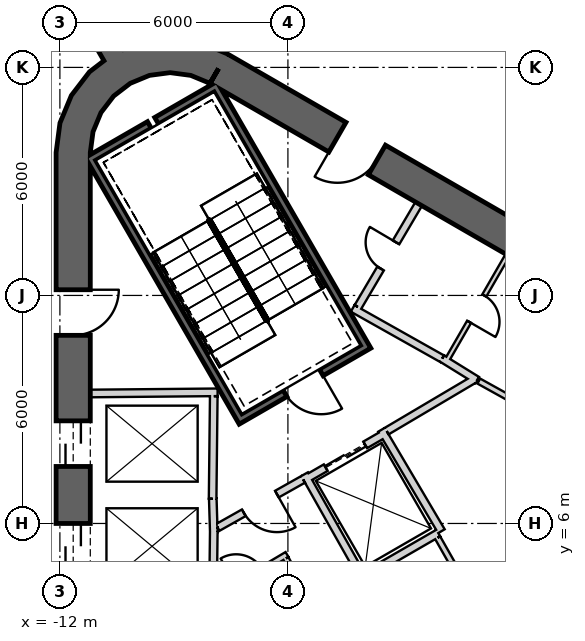
"""IFC4 building model, lengths in metres.
Left out: names, types, materials, properties, quantities, classifications, styles, units other than length and angle.
Written with IfcOpenShell. Run it as: python <this file> out.ifc"""

import sys

from ifc_helpers import new_model, si_unit, direction, frame, frame_2d, origin, place, context, subcontext, project, spatial, polyline, rectangle, outline, extrude, element, fill, save


model = new_model("IFC4")
c1 = context("Model", 3, precision=1e-05, world=origin(), true_north=direction((0.0, 1.0)))
c2 = subcontext(c1, "Body", "Model", "MODEL_VIEW")
j1 = project(units=[si_unit("LENGTHUNIT", "METRE"), si_unit("PLANEANGLEUNIT", "RADIAN")], contexts=[c1])
p1 = place(None, origin())
s1 = spatial("IfcSite", under=j1, at=p1, CompositionType="ELEMENT")
p2 = place(p1, origin())
s2 = spatial("IfcBuilding", under=s1, at=p2, CompositionType="ELEMENT")
p3 = place(p2, frame((0.0, 0.0, 392.3)))
s3 = spatial("IfcBuildingStorey", under=s2, at=p3, CompositionType="ELEMENT", Elevation=392.3)
p4 = place(p3, frame((19.475, 2.208, 0.0), z_axis=(0.0, 0.0, 1.0), x_axis=(-0.866028369851, 0.499994862586, 0.0)))
e1 = element("IfcWall", 1, at=p4, inside=s3, PredefinedType="SHEAR", context=c2, shape_type="SweptSolid", body=[
    extrude(rectangle(XDim=31.523, YDim=0.9, at=frame_2d((15.762, 0.0))), origin(), (0.0, 0.0, 1.0), 6.0),
])
p5 = place(p4, frame((7.062, 0.0, 0.0)))
e2 = element("IfcOpeningElement", 2, at=p5, cuts=e1, PredefinedType="OPENING", context=c2, shape_type="SweptSolid", body=[
    extrude(rectangle(XDim=1.2, YDim=2.4, at=frame_2d((0.6, 1.2))), frame((0.0, 0.46, 0.0), z_axis=(0.0, -1.0, 0.0), x_axis=(1.0, 0.0, 0.0)), (0.0, 0.0, 1.0), 0.92),
])
p6 = place(p4, frame((3.612, 0.0, 0.0)))
e3 = element("IfcOpeningElement", 3, at=p6, cuts=e1, PredefinedType="OPENING", context=c2, shape_type="SweptSolid", body=[
    extrude(rectangle(XDim=1.2, YDim=2.4, at=frame_2d((0.6, 1.2))), frame((0.0, 0.46, 0.0), z_axis=(0.0, -1.0, 0.0), x_axis=(1.0, 0.0, 0.0)), (0.0, 0.0, 1.0), 0.92),
])
p7 = place(p4, frame((26.712, 0.0, 0.0)))
e4 = element("IfcOpeningElement", 4, at=p7, cuts=e1, PredefinedType="OPENING", context=c2, shape_type="SweptSolid", body=[
    extrude(rectangle(XDim=1.2, YDim=2.4, at=frame_2d((0.6, 1.2))), frame((0.0, 0.46, 0.0), z_axis=(0.0, -1.0, 0.0), x_axis=(1.0, 0.0, 0.0)), (0.0, 0.0, 1.0), 0.92),
])
p8 = place(p3, frame((-11.65, 15.762, 0.0), z_axis=(0.0, 0.0, 1.0), x_axis=(0.0, -1.0, 0.0)))
e5 = element("IfcWall", 5, at=p8, inside=s3, PredefinedType="SHEAR", context=c2, shape_type="SweptSolid", body=[
    extrude(rectangle(XDim=31.523, YDim=0.9, at=frame_2d((15.762, 0.0))), origin(), (0.0, 0.0, 1.0), 6.0),
])
p9 = place(p8, frame((7.062, 0.0, 0.0)))
e6 = element("IfcOpeningElement", 6, at=p9, cuts=e5, PredefinedType="OPENING", context=c2, shape_type="SweptSolid", body=[
    extrude(rectangle(XDim=1.2, YDim=2.4, at=frame_2d((0.6, 1.2))), frame((0.0, 0.46, 0.0), z_axis=(0.0, -1.0, 0.0), x_axis=(1.0, 0.0, 0.0)), (0.0, 0.0, 1.0), 0.92),
])
p10 = place(p8, frame((9.762, 0.0, 0.0)))
e7 = element("IfcOpeningElement", 7, at=p10, cuts=e5, PredefinedType="OPENING", context=c2, shape_type="SweptSolid", body=[
    extrude(rectangle(XDim=1.2, YDim=2.4, at=frame_2d((0.6, 1.2))), frame((0.0, 0.46, 0.0), z_axis=(0.0, -1.0, 0.0), x_axis=(1.0, 0.0, 0.0)), (0.0, 0.0, 1.0), 0.92),
])
p11 = place(p8, frame((12.462, 0.0, 0.0)))
e8 = element("IfcOpeningElement", 8, at=p11, cuts=e5, PredefinedType="OPENING", context=c2, shape_type="SweptSolid", body=[
    extrude(rectangle(XDim=1.2, YDim=2.4, at=frame_2d((0.6, 1.2))), frame((0.0, 0.46, 0.0), z_axis=(0.0, -1.0, 0.0), x_axis=(1.0, 0.0, 0.0)), (0.0, 0.0, 1.0), 0.92),
])
p12 = place(p8, frame((15.162, 0.0, 0.0)))
e9 = element("IfcOpeningElement", 9, at=p12, cuts=e5, PredefinedType="OPENING", context=c2, shape_type="SweptSolid", body=[
    extrude(rectangle(XDim=1.2, YDim=2.4, at=frame_2d((0.6, 1.2))), frame((0.0, 0.46, 0.0), z_axis=(0.0, -1.0, 0.0), x_axis=(1.0, 0.0, 0.0)), (0.0, 0.0, 1.0), 0.92),
])
p13 = place(p8, frame((17.862, 0.0, 0.0)))
e10 = element("IfcOpeningElement", 10, at=p13, cuts=e5, PredefinedType="OPENING", context=c2, shape_type="SweptSolid", body=[
    extrude(rectangle(XDim=1.2, YDim=2.4, at=frame_2d((0.6, 1.2))), frame((0.0, 0.46, 0.0), z_axis=(0.0, -1.0, 0.0), x_axis=(1.0, 0.0, 0.0)), (0.0, 0.0, 1.0), 0.92),
])
p14 = place(p8, frame((20.562, 0.0, 0.0)))
e11 = element("IfcOpeningElement", 11, at=p14, cuts=e5, PredefinedType="OPENING", context=c2, shape_type="SweptSolid", body=[
    extrude(rectangle(XDim=1.2, YDim=2.4, at=frame_2d((0.6, 1.2))), frame((0.0, 0.46, 0.0), z_axis=(0.0, -1.0, 0.0), x_axis=(1.0, 0.0, 0.0)), (0.0, 0.0, 1.0), 0.92),
])
p15 = place(p8, frame((23.262, 0.0, 0.0)))
e12 = element("IfcOpeningElement", 12, at=p15, cuts=e5, PredefinedType="OPENING", context=c2, shape_type="SweptSolid", body=[
    extrude(rectangle(XDim=1.2, YDim=2.4, at=frame_2d((0.6, 1.2))), frame((0.0, 0.46, 0.0), z_axis=(0.0, -1.0, 0.0), x_axis=(1.0, 0.0, 0.0)), (0.0, 0.0, 1.0), 0.92),
])
p16 = place(p8, frame((3.612, 0.0, 0.0)))
e13 = element("IfcOpeningElement", 13, at=p16, cuts=e5, PredefinedType="OPENING", context=c2, shape_type="SweptSolid", body=[
    extrude(rectangle(XDim=1.2, YDim=2.4, at=frame_2d((0.6, 1.2))), frame((0.0, 0.46, 0.0), z_axis=(0.0, -1.0, 0.0), x_axis=(1.0, 0.0, 0.0)), (0.0, 0.0, 1.0), 0.92),
])
p17 = place(p8, frame((26.712, 0.0, 0.0)))
e14 = element("IfcOpeningElement", 14, at=p17, cuts=e5, PredefinedType="OPENING", context=c2, shape_type="SweptSolid", body=[
    extrude(rectangle(XDim=1.2, YDim=2.4, at=frame_2d((0.6, 1.2))), frame((0.0, 0.46, 0.0), z_axis=(0.0, -1.0, 0.0), x_axis=(1.0, 0.0, 0.0)), (0.0, 0.0, 1.0), 0.92),
])
p18 = place(p3, origin())
e15 = element("IfcWall", 15, at=p18, inside=s3, PredefinedType="SHEAR", context=c2, shape_type="SweptSolid", body=[
    extrude(outline(polyline([(-7.6, 18.36), (-8.323, 18.659), (-9.1, 18.762), (-9.876, 18.659), (-10.6, 18.36), (-11.221, 17.883), (-11.698, 17.262), (-11.998, 16.538), (-12.1, 15.762), (-11.2, 15.762), (-11.128, 16.305), (-10.919, 16.812), (-10.585, 17.247), (-10.15, 17.58), (-9.644, 17.79), (-9.1, 17.862), (-8.556, 17.79), (-8.05, 17.58), (-7.6, 18.36)])), origin(), (0.0, 0.0, 1.0), 6.0),
])
p19 = place(p3, frame((-10.575, 18.316, 0.0), z_axis=(0.0, 0.0, 1.0), x_axis=(-0.500011655475, 0.866018674388, 0.0)))
e16 = element("IfcWall", 16, at=p19, inside=s3, PredefinedType="SHEAR", context=c2, shape_type="SweptSolid", body=[
    extrude(rectangle(XDim=6.455, YDim=0.6, at=frame_2d((3.228, 0.0))), origin(), (0.0, 0.0, 1.0), 6.0),
])
p20 = place(p19, frame((2.05, 0.0, 0.0)))
e17 = element("IfcOpeningElement", 17, at=p20, cuts=e16, PredefinedType="OPENING", context=c2, shape_type="SweptSolid", body=[
    extrude(rectangle(XDim=1.4, YDim=2.4, at=frame_2d((0.7, 1.2))), frame((0.0, 0.31, 0.0), z_axis=(0.0, -1.0, 0.0), x_axis=(1.0, 0.0, 0.0)), (0.0, 0.0, 1.0), 0.62),
])
p21 = place(p3, frame((-11.2, 9.42, 0.0), z_axis=(0.0, 0.0, 1.0), x_axis=(0.999957167047, 0.009255488683, 0.0)))
e18 = element("IfcWall", 18, at=p21, inside=s3, PredefinedType="PLUMBINGWALL", context=c2, shape_type="SweptSolid", body=[
    extrude(rectangle(XDim=3.35, YDim=0.2, at=frame_2d((1.675, 0.0))), origin(), (0.0, 0.0, 1.0), 5.7),
])
p22 = place(p3, frame((-7.951, 9.35, 0.0), z_axis=(0.0, 0.0, 1.0), x_axis=(-0.011120469654, -0.999938165666, 0.0)))
e19 = element("IfcWall", 19, at=p22, inside=s3, PredefinedType="PLUMBINGWALL", context=c2, shape_type="SweptSolid", body=[
    extrude(rectangle(XDim=2.7, YDim=0.2, at=frame_2d((1.35, 0.0))), origin(), (0.0, 0.0, 1.0), 5.7),
])
p23 = place(p3, frame((-7.977, 6.65, 0.0), z_axis=(0.0, 0.0, 1.0), x_axis=(0.030861509705, -0.999523670164, 0.0)))
e20 = element("IfcWall", 20, at=p23, inside=s3, PredefinedType="PLUMBINGWALL", context=c2, shape_type="SweptSolid", body=[
    extrude(rectangle(XDim=0.878, YDim=0.2, at=frame_2d((0.439, 0.0))), origin(), (0.0, 0.0, 1.0), 5.7),
])
p24 = place(p3, frame((-7.949, 5.895, 0.0), z_axis=(0.0, 0.0, 1.0), x_axis=(-0.012042535896, -0.999927486035, 0.0)))
e21 = element("IfcWall", 21, at=p24, inside=s3, PredefinedType="PLUMBINGWALL", context=c2, shape_type="SweptSolid", body=[
    extrude(rectangle(XDim=1.845, YDim=0.2, at=frame_2d((0.922, 0.0))), origin(), (0.0, 0.0, 1.0), 5.7),
])
p25 = place(p3, frame((-11.245, 15.678, -0.35), z_axis=(0.0, 0.0, 1.0), x_axis=(0.499977274689, -0.866038523851, 0.0)))
e22 = element("IfcWall", 22, at=p25, inside=s3, PredefinedType="SHEAR", context=c2, shape_type="SweptSolid", body=[
    extrude(rectangle(XDim=8.1, YDim=0.2, at=frame_2d((4.05, 0.0))), origin(), (0.0, 0.0, 1.0), 6.05),
])
p26 = place(p3, frame((-7.818, 17.541, -0.35), z_axis=(0.0, 0.0, 1.0), x_axis=(-0.866088799389, -0.499890179513, 0.0)))
e23 = element("IfcWall", 23, at=p26, inside=s3, PredefinedType="SHEAR", context=c2, shape_type="SweptSolid", body=[
    extrude(rectangle(XDim=1.89, YDim=0.2, at=frame_2d((0.945, 0.0))), origin(), (0.0, 0.0, 1.0), 6.05),
])
p27 = place(p3, frame((-9.645, 16.486, -0.35), z_axis=(0.0, 0.0, 1.0), x_axis=(-0.866038843867, -0.499976720371, 0.0)))
e24 = element("IfcWall", 24, at=p27, inside=s3, PredefinedType="SHEAR", context=c2, shape_type="SweptSolid", body=[
    extrude(rectangle(XDim=1.69, YDim=0.2, at=frame_2d((0.845, 0.0))), origin(), (0.0, 0.0, 1.0), 6.05),
])
p28 = place(p3, frame((-7.854, 17.405, -0.35), z_axis=(0.0, 0.0, 1.0), x_axis=(0.499997992926, -0.866026562566, 0.0)))
e25 = element("IfcWall", 25, at=p28, inside=s3, PredefinedType="SHEAR", context=c2, shape_type="SweptSolid", body=[
    extrude(rectangle(XDim=7.9, YDim=0.2, at=frame_2d((3.95, 0.0))), origin(), (0.0, 0.0, 1.0), 6.05),
])
p29 = place(p3, frame((-7.159, 8.8, -0.35), z_axis=(0.0, 0.0, 1.0), x_axis=(0.866047807691, 0.499961193289, 0.0)))
e26 = element("IfcWall", 26, at=p29, inside=s3, PredefinedType="SHEAR", context=c2, shape_type="SweptSolid", body=[
    extrude(rectangle(XDim=3.6, YDim=0.2, at=frame_2d((1.8, 0.0))), origin(), (0.0, 0.0, 1.0), 6.05),
])
p30 = place(p29, frame((1.25, 0.0, 0.35)))
e27 = element("IfcOpeningElement", 27, at=p30, cuts=e26, PredefinedType="OPENING", context=c2, shape_type="SweptSolid", body=[
    extrude(rectangle(XDim=1.1, YDim=2.1, at=frame_2d((0.55, 1.05))), frame((0.0, 0.11, 0.0), z_axis=(0.0, -1.0, 0.0), x_axis=(1.0, 0.0, 0.0)), (0.0, 0.0, 1.0), 0.22),
])
p31 = place(p3, frame((-5.524, 7.168, 0.0), z_axis=(0.0, 0.0, 1.0), x_axis=(0.866024647952, 0.500001309137, 0.0)))
e28 = element("IfcWall", 28, at=p31, inside=s3, PredefinedType="PLUMBINGWALL", context=c2, shape_type="SweptSolid", body=[
    extrude(rectangle(XDim=2.4, YDim=0.2, at=frame_2d((1.2, 0.0))), origin(), (0.0, 0.0, 1.0), 5.7),
])
p32 = place(p31, frame((0.6, 0.0, 0.0)))
e29 = element("IfcOpeningElement", 29, at=p32, cuts=e28, PredefinedType="OPENING", context=c2, shape_type="SweptSolid", body=[
    extrude(rectangle(XDim=1.2, YDim=2.4, at=frame_2d((0.6, 1.2))), frame((0.0, 0.11, 0.0), z_axis=(0.0, -1.0, 0.0), x_axis=(1.0, 0.0, 0.0)), (0.0, 0.0, 1.0), 0.22),
])
p33 = place(p3, frame((-3.538, 8.465, 0.0), z_axis=(0.0, 0.0, 1.0), x_axis=(0.508647062354, -0.860975125052, 0.0)))
e30 = element("IfcWall", 30, at=p33, inside=s3, PredefinedType="PLUMBINGWALL", context=c2, shape_type="SweptSolid", body=[
    extrude(rectangle(XDim=3.1, YDim=0.2, at=frame_2d((1.55, 0.0))), origin(), (0.0, 0.0, 1.0), 5.7),
])
p34 = place(p3, frame((-2.043, 5.748, 0.0), z_axis=(0.0, 0.0, 1.0), x_axis=(-0.866035096217, -0.499983211839, 0.0)))
e31 = element("IfcWall", 31, at=p34, inside=s3, PredefinedType="PLUMBINGWALL", context=c2, shape_type="SweptSolid", body=[
    extrude(rectangle(XDim=2.404, YDim=0.2, at=frame_2d((1.202, 0.0))), origin(), (0.0, 0.0, 1.0), 5.7),
])
p35 = place(p3, frame((-5.562, 7.296, 0.0), z_axis=(0.0, 0.0, 1.0), x_axis=(0.49134651263, -0.870964180966, 0.0)))
e32 = element("IfcWall", 32, at=p35, inside=s3, PredefinedType="PLUMBINGWALL", context=c2, shape_type="SweptSolid", body=[
    extrude(rectangle(XDim=3.0, YDim=0.2, at=frame_2d((1.5, 0.0))), origin(), (0.0, 0.0, 1.0), 5.7),
])
p36 = place(p3, frame((-0.22, 13.06, 0.0), z_axis=(0.0, 0.0, 1.0), x_axis=(-0.499984717929, -0.866034226713, 0.0)))
e33 = element("IfcWall", 33, at=p36, inside=s3, PredefinedType="PARTITIONING", context=c2, shape_type="SweptSolid", body=[
    extrude(rectangle(XDim=3.25, YDim=0.12, at=frame_2d((1.625, 0.0))), origin(), (0.0, 0.0, 1.0), 5.7),
])
p37 = place(p36, frame((1.225, 0.0, 0.0)))
e34 = element("IfcOpeningElement", 34, at=p37, cuts=e33, PredefinedType="OPENING", context=c2, shape_type="SweptSolid", body=[
    extrude(rectangle(XDim=0.8, YDim=2.1, at=frame_2d((0.4, 1.05))), frame((0.0, 0.07, 0.0), z_axis=(0.0, -1.0, 0.0), x_axis=(1.0, 0.0, 0.0)), (0.0, 0.0, 1.0), 0.14),
])
p38 = place(p3, frame((-1.941, 10.339, 0.0), z_axis=(0.0, 0.0, 1.0), x_axis=(0.850216889117, -0.526432561171, 0.0)))
e35 = element("IfcWall", 35, at=p38, inside=s3, PredefinedType="PARTITIONING", context=c2, shape_type="SweptSolid", body=[
    extrude(rectangle(XDim=1.078, YDim=0.2, at=frame_2d((0.539, 0.0))), origin(), (0.0, 0.0, 1.0), 5.7),
])
p39 = place(p3, frame((0.483, 8.936, 0.0), z_axis=(0.0, 0.0, 1.0), x_axis=(-0.874315691004, 0.485357674776, 0.0)))
e36 = element("IfcWall", 36, at=p39, inside=s3, PredefinedType="PLUMBINGWALL", context=c2, shape_type="SweptSolid", body=[
    extrude(rectangle(XDim=1.671, YDim=0.15, at=frame_2d((0.836, 0.0))), origin(), (0.0, 0.0, 1.0), 5.7),
])
p40 = place(p3, frame((-4.296, 11.659, 0.0), z_axis=(0.0, 0.0, 1.0), x_axis=(0.871534483978, -0.490334215854, 0.0)))
e37 = element("IfcWall", 37, at=p40, inside=s3, PredefinedType="PARTITIONING", context=c2, shape_type="SweptSolid", body=[
    extrude(rectangle(XDim=2.7, YDim=0.2, at=frame_2d((1.35, 0.0))), origin(), (0.0, 0.0, 1.0), 5.7),
])
p41 = place(p3, frame((-2.558, 14.409, 0.0), z_axis=(0.0, 0.0, 1.0), x_axis=(-0.508018930956, -0.861345903683, 0.0)))
e38 = element("IfcWall", 38, at=p41, inside=s3, PredefinedType="PARTITIONING", context=c2, shape_type="SweptSolid", body=[
    extrude(rectangle(XDim=3.15, YDim=0.2, at=frame_2d((1.575, 0.0))), origin(), (0.0, 0.0, 1.0), 5.7),
])
p42 = place(p41, frame((1.175, 0.0, 0.0)))
e39 = element("IfcOpeningElement", 39, at=p42, cuts=e38, PredefinedType="OPENING", context=c2, shape_type="SweptSolid", body=[
    extrude(rectangle(XDim=0.8, YDim=2.1, at=frame_2d((0.4, 1.05))), frame((0.0, 0.11, 0.0), z_axis=(0.0, -1.0, 0.0), x_axis=(1.0, 0.0, 0.0)), (0.0, 0.0, 1.0), 0.22),
])
p43 = place(p3, frame((-1.056, 9.818, 0.0), z_axis=(0.0, 0.0, 1.0), x_axis=(-0.860599924646, -0.509281621207, 0.0)))
e40 = element("IfcWall", 40, at=p43, inside=s3, PredefinedType="PARTITIONING", context=c2, shape_type="SweptSolid", body=[
    extrude(rectangle(XDim=2.725, YDim=0.2, at=frame_2d((1.362, 0.0))), origin(), (0.0, 0.0, 1.0), 5.7),
])
p44 = place(p3, frame((-5.6, 7.16, 0.0), z_axis=(0.0, 0.0, 1.0), x_axis=(-0.871363259478, -0.490638431059, 0.0)))
e41 = element("IfcWall", 41, at=p44, inside=s3, PredefinedType="PARTITIONING", context=c2, shape_type="SweptSolid", body=[
    extrude(rectangle(XDim=2.581, YDim=0.2, at=frame_2d((1.291, 0.0))), origin(), (0.0, 0.0, 1.0), 5.7),
])
p45 = place(p44, frame((0.791, 0.0, 0.0)))
e42 = element("IfcOpeningElement", 42, at=p45, cuts=e41, PredefinedType="OPENING", context=c2, shape_type="SweptSolid", body=[
    extrude(rectangle(XDim=1.0, YDim=2.1, at=frame_2d((0.5, 1.05))), frame((0.0, 0.11, 0.0), z_axis=(0.0, -1.0, 0.0), x_axis=(1.0, 0.0, 0.0)), (0.0, 0.0, 1.0), 0.22),
])
p46 = place(p3, frame((-2.059, 5.624, 0.0), z_axis=(0.0, 0.0, 1.0), x_axis=(0.494149180773, -0.869377125959, 0.0)))
e43 = element("IfcWall", 43, at=p46, inside=s3, PredefinedType="PLUMBINGWALL", context=c2, shape_type="SweptSolid", body=[
    extrude(rectangle(XDim=4.231, YDim=0.15, at=frame_2d((2.116, 0.0))), origin(), (0.0, 0.0, 1.0), 5.7),
])
p47 = place(p3, frame((-6.024, 5.183, 0.0), z_axis=(0.0, 0.0, 1.0), x_axis=(-0.860126804455, -0.510080268447, 0.0)))
e44 = element("IfcWall", 44, at=p47, inside=s3, PredefinedType="PLUMBINGWALL", context=c2, shape_type="SweptSolid", body=[
    extrude(rectangle(XDim=2.24, YDim=0.15, at=frame_2d((1.12, 0.0))), origin(), (0.0, 0.0, 1.0), 5.7),
])
p48 = place(p47, frame((0.757, 0.0, 0.0)))
e45 = element("IfcOpeningElement", 45, at=p48, cuts=e44, PredefinedType="OPENING", context=c2, shape_type="SweptSolid", body=[
    extrude(rectangle(XDim=0.8, YDim=2.1, at=frame_2d((0.4, 1.05))), frame((0.0, 0.085, 0.0), z_axis=(0.0, -1.0, 0.0), x_axis=(1.0, 0.0, 0.0)), (0.0, 0.0, 1.0), 0.17),
])
p49 = place(p3, frame((-5.571, 4.19, 0.0), z_axis=(0.0, 0.0, 1.0), x_axis=(-0.476127658675, 0.879376172434, 0.0)))
e46 = element("IfcWall", 46, at=p49, inside=s3, PredefinedType="PLUMBINGWALL", context=c2, shape_type="SweptSolid", body=[
    extrude(rectangle(XDim=1.012, YDim=0.15, at=frame_2d((0.506, 0.0))), origin(), (0.0, 0.0, 1.0), 5.7),
])
p50 = place(p3, frame((2.612, 17.66, 0.0), z_axis=(0.0, 0.0, 1.0), x_axis=(-0.866027543104, 0.499996294571, 0.0)))
e47 = element("IfcWall", 47, at=p50, inside=s3, PredefinedType="PARTITIONING", context=c2, shape_type="SweptSolid", body=[
    extrude(rectangle(XDim=10.007, YDim=0.12, at=frame_2d((5.003, 0.0))), origin(), (0.0, 0.0, 1.0), 5.07),
])
p51 = place(p50, frame((4.532, 0.0, 0.0)))
e48 = element("IfcOpeningElement", 48, at=p51, cuts=e47, PredefinedType="OPENING", context=c2, shape_type="SweptSolid", body=[
    extrude(rectangle(XDim=1.0, YDim=2.1, at=frame_2d((0.5, 1.05))), frame((0.0, 0.07, 0.0), z_axis=(0.0, -1.0, 0.0), x_axis=(1.0, 0.0, 0.0)), (0.0, 0.0, 1.0), 0.14),
])
p52 = place(p30, origin())
e49 = element("IfcDoor", 49, at=p52, inside=s3, OperationType="SINGLE_SWING_RIGHT", PredefinedType="USERDEFINED", context=c2, shape_type="SweptSolid", body=[
    extrude(rectangle(XDim=1.1, YDim=2.1, at=frame_2d((0.55, 1.05))), frame((0.0, 0.025, 0.0), z_axis=(0.0, -1.0, 0.0), x_axis=(1.0, 0.0, 0.0)), (0.0, 0.0, 1.0), 0.05),
])
fill(e27, e49)
p53 = place(p45, origin())
e50 = element("IfcDoor", 50, at=p53, inside=s3, OperationType="SINGLE_SWING_LEFT", PredefinedType="USERDEFINED", context=c2, shape_type="SweptSolid", body=[
    extrude(rectangle(XDim=1.0, YDim=2.1, at=frame_2d((0.5, 1.05))), frame((0.0, 0.025, 0.0), z_axis=(0.0, -1.0, 0.0), x_axis=(1.0, 0.0, 0.0)), (0.0, 0.0, 1.0), 0.05),
])
fill(e42, e50)
p54 = place(p32, origin())
e51 = element("IfcDoor", 51, at=p54, inside=s3, OperationType="SLIDING_TO_LEFT", PredefinedType="USERDEFINED", context=c2, shape_type="SweptSolid", body=[
    extrude(rectangle(XDim=1.2, YDim=2.4, at=frame_2d((0.6, 1.2))), frame((0.0, 0.025, 0.0), z_axis=(0.0, -1.0, 0.0), x_axis=(1.0, 0.0, 0.0)), (0.0, 0.0, 1.0), 0.05),
])
fill(e29, e51)
p55 = place(p42, origin())
e52 = element("IfcDoor", 52, at=p55, inside=s3, OperationType="SINGLE_SWING_LEFT", PredefinedType="USERDEFINED", context=c2, shape_type="SweptSolid", body=[
    extrude(rectangle(XDim=0.8, YDim=2.1, at=frame_2d((0.4, 1.05))), frame((0.0, 0.025, 0.0), z_axis=(0.0, -1.0, 0.0), x_axis=(1.0, 0.0, 0.0)), (0.0, 0.0, 1.0), 0.05),
])
fill(e39, e52)
p56 = place(p37, origin())
e53 = element("IfcDoor", 53, at=p56, inside=s3, OperationType="SINGLE_SWING_RIGHT", PredefinedType="USERDEFINED", context=c2, shape_type="SweptSolid", body=[
    extrude(rectangle(XDim=0.8, YDim=2.1, at=frame_2d((0.4, 1.05))), frame((0.0, 0.025, 0.0), z_axis=(0.0, -1.0, 0.0), x_axis=(1.0, 0.0, 0.0)), (0.0, 0.0, 1.0), 0.05),
])
fill(e34, e53)
p57 = place(p9, origin())
e54 = element("IfcDoor", 54, at=p57, inside=s3, OperationType="SLIDING_TO_LEFT", PredefinedType="USERDEFINED", context=c2, shape_type="SweptSolid", body=[
    extrude(rectangle(XDim=1.2, YDim=2.4, at=frame_2d((0.6, 1.2))), frame((0.0, 0.025, 0.0), z_axis=(0.0, -1.0, 0.0), x_axis=(1.0, 0.0, 0.0)), (0.0, 0.0, 1.0), 0.05),
])
fill(e6, e54)
p58 = place(p10, origin())
e55 = element("IfcDoor", 55, at=p58, inside=s3, OperationType="SLIDING_TO_LEFT", PredefinedType="USERDEFINED", context=c2, shape_type="SweptSolid", body=[
    extrude(rectangle(XDim=1.2, YDim=2.4, at=frame_2d((0.6, 1.2))), frame((0.0, 0.025, 0.0), z_axis=(0.0, -1.0, 0.0), x_axis=(1.0, 0.0, 0.0)), (0.0, 0.0, 1.0), 0.05),
])
fill(e7, e55)
p59 = place(p7, origin())
e56 = element("IfcDoor", 56, at=p59, inside=s3, OperationType="SINGLE_SWING_RIGHT", PredefinedType="USERDEFINED", context=c2, shape_type="SweptSolid", body=[
    extrude(rectangle(XDim=1.2, YDim=2.4, at=frame_2d((0.6, 1.2))), frame((0.0, 0.025, 0.0), z_axis=(0.0, -1.0, 0.0), x_axis=(1.0, 0.0, 0.0)), (0.0, 0.0, 1.0), 0.05),
])
fill(e4, e56)
p60 = place(p16, origin())
e57 = element("IfcDoor", 57, at=p60, inside=s3, OperationType="SINGLE_SWING_LEFT", PredefinedType="USERDEFINED", context=c2, shape_type="SweptSolid", body=[
    extrude(rectangle(XDim=1.2, YDim=2.4, at=frame_2d((0.6, 1.2))), frame((0.0, 0.025, 0.0), z_axis=(0.0, -1.0, 0.0), x_axis=(1.0, 0.0, 0.0)), (0.0, 0.0, 1.0), 0.05),
])
fill(e13, e57)
save(model, sys.argv[1])
